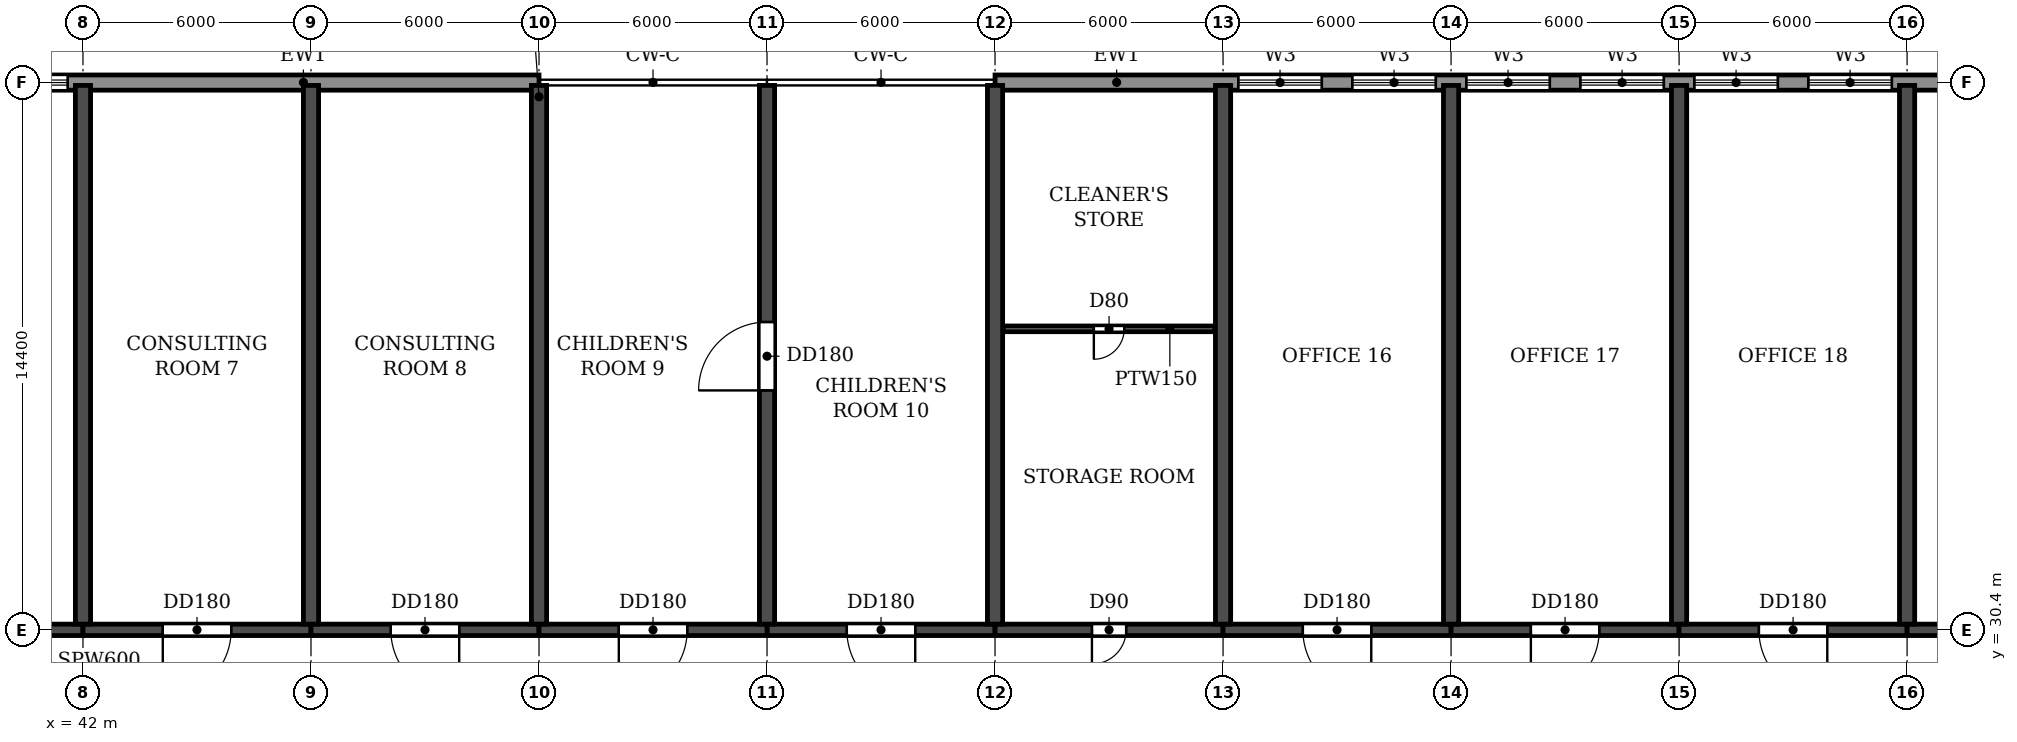
"""IFC4 building model, lengths in metres.
Left out: names, types, materials, properties, quantities, classifications, styles, units other than length and angle.
Written with IfcOpenShell. Run it as: python <this file> out.ifc"""

import sys

from ifc_helpers import new_model, si_unit, direction, frame, frame_2d, origin, place, context, subcontext, project, spatial, rectangle, extrude, element, fill, save


model = new_model("IFC4")
c1 = context("Model", 3, precision=1e-05, world=origin(), true_north=direction((0.0, 1.0)))
c2 = subcontext(c1, "Body", "Model", "MODEL_VIEW")
j1 = project(units=[si_unit("LENGTHUNIT", "METRE"), si_unit("PLANEANGLEUNIT", "RADIAN")], contexts=[c1])
p1 = place(None, origin())
s1 = spatial("IfcSite", under=j1, at=p1, CompositionType="ELEMENT")
p2 = place(p1, origin())
s2 = spatial("IfcBuilding", under=s1, at=p2, CompositionType="ELEMENT")
p3 = place(p2, frame((0.0, 0.0, 53.1)))
s3 = spatial("IfcBuildingStorey", under=s2, at=p3, CompositionType="ELEMENT", Elevation=53.1)
for number, where, z_axis, x_axis in (
    (1, (42.0, 30.55, 0.0), (0.0, 0.0, 1.0), (0.0, 1.0, 0.0)),
    (2, (48.0, 30.55, 0.0), (0.0, 0.0, 1.0), (0.0, 1.0, 0.0)),
    (3, (54.0, 30.55, 0.0), (0.0, 0.0, 1.0), (0.0, 1.0, 0.0)),
):
    element("IfcWall", number, at=place(p3, frame(where, z_axis=z_axis, x_axis=x_axis)), inside=s3, PredefinedType="SHEAR", context=c2, shape_type="SweptSolid", body=[
        extrude(rectangle(XDim=14.175, YDim=0.4, at=frame_2d((7.087, 0.0))), origin(), (0.0, 0.0, 1.0), 3.05),
    ])
p4 = place(p3, frame((60.0, 30.55, 0.0), z_axis=(0.0, 0.0, 1.0), x_axis=(0.0, 1.0, 0.0)))
e4 = element("IfcWall", 4, at=p4, inside=s3, PredefinedType="SHEAR", context=c2, shape_type="SweptSolid", body=[
    extrude(rectangle(XDim=14.175, YDim=0.4, at=frame_2d((7.087, 0.0))), origin(), (0.0, 0.0, 1.0), 3.05),
])
p5 = place(p4, frame((6.15, 0.0, 0.0)))
e5 = element("IfcOpeningElement", 5, at=p5, cuts=e4, PredefinedType="OPENING", context=c2, shape_type="SweptSolid", body=[
    extrude(rectangle(XDim=1.8, YDim=2.1, at=frame_2d((0.9, 1.05))), frame((0.0, 0.21, 0.0), z_axis=(0.0, -1.0, 0.0), x_axis=(1.0, 0.0, 0.0)), (0.0, 0.0, 1.0), 0.42),
])
for number, where, z_axis, x_axis in (
    (6, (66.0, 30.55, 0.0), (0.0, 0.0, 1.0), (0.0, 1.0, 0.0)),
    (7, (72.0, 30.55, 0.0), (0.0, 0.0, 1.0), (0.0, 1.0, 0.0)),
    (8, (78.0, 30.55, 0.0), (0.0, 0.0, 1.0), (0.0, 1.0, 0.0)),
    (9, (84.0, 30.55, 0.0), (0.0, 0.0, 1.0), (0.0, 1.0, 0.0)),
    (10, (90.0, 30.55, 0.0), (0.0, 0.0, 1.0), (0.0, 1.0, 0.0)),
):
    element("IfcWall", number, at=place(p3, frame(where, z_axis=z_axis, x_axis=x_axis)), inside=s3, PredefinedType="SHEAR", context=c2, shape_type="SweptSolid", body=[
        extrude(rectangle(XDim=14.175, YDim=0.4, at=frame_2d((7.087, 0.0))), origin(), (0.0, 0.0, 1.0), 3.05),
    ])
p6 = place(p3, frame((36.0, 30.4, 0.0), z_axis=(0.0, 0.0, 1.0), x_axis=(1.0, 0.0, 0.0)))
e11 = element("IfcWall", 11, at=p6, inside=s3, PredefinedType="SHEAR", context=c2, shape_type="SweptSolid", body=[
    extrude(rectangle(XDim=6.0, YDim=0.3, at=frame_2d((3.0, 0.0))), origin(), (0.0, 0.0, 1.0), 2.45),
])
p7 = place(p6, frame((2.1, 0.0, 0.0)))
e12 = element("IfcOpeningElement", 12, at=p7, cuts=e11, PredefinedType="OPENING", context=c2, shape_type="SweptSolid", body=[
    extrude(rectangle(XDim=1.8, YDim=2.1, at=frame_2d((0.9, 1.05))), frame((0.0, 0.16, 0.0), z_axis=(0.0, -1.0, 0.0), x_axis=(1.0, 0.0, 0.0)), (0.0, 0.0, 1.0), 0.32),
])
p8 = place(p3, frame((42.0, 30.4, 0.0), z_axis=(0.0, 0.0, 1.0), x_axis=(1.0, 0.0, 0.0)))
e13 = element("IfcWall", 13, at=p8, inside=s3, PredefinedType="SHEAR", context=c2, shape_type="SweptSolid", body=[
    extrude(rectangle(XDim=6.0, YDim=0.3, at=frame_2d((3.0, 0.0))), origin(), (0.0, 0.0, 1.0), 2.45),
])
p9 = place(p8, frame((2.1, 0.0, 0.0)))
e14 = element("IfcOpeningElement", 14, at=p9, cuts=e13, PredefinedType="OPENING", context=c2, shape_type="SweptSolid", body=[
    extrude(rectangle(XDim=1.8, YDim=2.1, at=frame_2d((0.9, 1.05))), frame((0.0, 0.16, 0.0), z_axis=(0.0, -1.0, 0.0), x_axis=(1.0, 0.0, 0.0)), (0.0, 0.0, 1.0), 0.32),
])
p10 = place(p3, frame((48.0, 30.4, 0.0), z_axis=(0.0, 0.0, 1.0), x_axis=(1.0, 0.0, 0.0)))
e15 = element("IfcWall", 15, at=p10, inside=s3, PredefinedType="SHEAR", context=c2, shape_type="SweptSolid", body=[
    extrude(rectangle(XDim=6.0, YDim=0.3, at=frame_2d((3.0, 0.0))), origin(), (0.0, 0.0, 1.0), 2.45),
])
p11 = place(p10, frame((2.1, 0.0, 0.0)))
e16 = element("IfcOpeningElement", 16, at=p11, cuts=e15, PredefinedType="OPENING", context=c2, shape_type="SweptSolid", body=[
    extrude(rectangle(XDim=1.8, YDim=2.1, at=frame_2d((0.9, 1.05))), frame((0.0, 0.16, 0.0), z_axis=(0.0, -1.0, 0.0), x_axis=(1.0, 0.0, 0.0)), (0.0, 0.0, 1.0), 0.32),
])
p12 = place(p3, frame((54.0, 30.4, 0.0), z_axis=(0.0, 0.0, 1.0), x_axis=(1.0, 0.0, 0.0)))
e17 = element("IfcWall", 17, at=p12, inside=s3, PredefinedType="SHEAR", context=c2, shape_type="SweptSolid", body=[
    extrude(rectangle(XDim=6.0, YDim=0.3, at=frame_2d((3.0, 0.0))), origin(), (0.0, 0.0, 1.0), 2.45),
])
p13 = place(p12, frame((2.1, 0.0, 0.0)))
e18 = element("IfcOpeningElement", 18, at=p13, cuts=e17, PredefinedType="OPENING", context=c2, shape_type="SweptSolid", body=[
    extrude(rectangle(XDim=1.8, YDim=2.1, at=frame_2d((0.9, 1.05))), frame((0.0, 0.16, 0.0), z_axis=(0.0, -1.0, 0.0), x_axis=(1.0, 0.0, 0.0)), (0.0, 0.0, 1.0), 0.32),
])
p14 = place(p3, frame((60.0, 30.4, 0.0), z_axis=(0.0, 0.0, 1.0), x_axis=(1.0, 0.0, 0.0)))
e19 = element("IfcWall", 19, at=p14, inside=s3, PredefinedType="SHEAR", context=c2, shape_type="SweptSolid", body=[
    extrude(rectangle(XDim=6.0, YDim=0.3, at=frame_2d((3.0, 0.0))), origin(), (0.0, 0.0, 1.0), 2.45),
])
p15 = place(p14, frame((2.1, 0.0, 0.0)))
e20 = element("IfcOpeningElement", 20, at=p15, cuts=e19, PredefinedType="OPENING", context=c2, shape_type="SweptSolid", body=[
    extrude(rectangle(XDim=1.8, YDim=2.1, at=frame_2d((0.9, 1.05))), frame((0.0, 0.16, 0.0), z_axis=(0.0, -1.0, 0.0), x_axis=(1.0, 0.0, 0.0)), (0.0, 0.0, 1.0), 0.32),
])
p16 = place(p3, frame((66.0, 30.4, 0.0), z_axis=(0.0, 0.0, 1.0), x_axis=(1.0, 0.0, 0.0)))
e21 = element("IfcWall", 21, at=p16, inside=s3, PredefinedType="SHEAR", context=c2, shape_type="SweptSolid", body=[
    extrude(rectangle(XDim=6.0, YDim=0.3, at=frame_2d((3.0, 0.0))), origin(), (0.0, 0.0, 1.0), 2.45),
])
p17 = place(p16, frame((2.55, 0.0, 0.0)))
e22 = element("IfcOpeningElement", 22, at=p17, cuts=e21, PredefinedType="OPENING", context=c2, shape_type="SweptSolid", body=[
    extrude(rectangle(XDim=0.9, YDim=2.1, at=frame_2d((0.45, 1.05))), frame((0.0, 0.16, 0.0), z_axis=(0.0, -1.0, 0.0), x_axis=(1.0, 0.0, 0.0)), (0.0, 0.0, 1.0), 0.32),
])
p18 = place(p3, frame((72.0, 30.4, 0.0), z_axis=(0.0, 0.0, 1.0), x_axis=(1.0, 0.0, 0.0)))
e23 = element("IfcWall", 23, at=p18, inside=s3, PredefinedType="SHEAR", context=c2, shape_type="SweptSolid", body=[
    extrude(rectangle(XDim=6.0, YDim=0.3, at=frame_2d((3.0, 0.0))), origin(), (0.0, 0.0, 1.0), 2.45),
])
p19 = place(p18, frame((2.1, 0.0, 0.0)))
e24 = element("IfcOpeningElement", 24, at=p19, cuts=e23, PredefinedType="OPENING", context=c2, shape_type="SweptSolid", body=[
    extrude(rectangle(XDim=1.8, YDim=2.1, at=frame_2d((0.9, 1.05))), frame((0.0, 0.16, 0.0), z_axis=(0.0, -1.0, 0.0), x_axis=(1.0, 0.0, 0.0)), (0.0, 0.0, 1.0), 0.32),
])
p20 = place(p3, frame((78.0, 30.4, 0.0), z_axis=(0.0, 0.0, 1.0), x_axis=(1.0, 0.0, 0.0)))
e25 = element("IfcWall", 25, at=p20, inside=s3, PredefinedType="SHEAR", context=c2, shape_type="SweptSolid", body=[
    extrude(rectangle(XDim=6.0, YDim=0.3, at=frame_2d((3.0, 0.0))), origin(), (0.0, 0.0, 1.0), 2.45),
])
p21 = place(p20, frame((2.1, 0.0, 0.0)))
e26 = element("IfcOpeningElement", 26, at=p21, cuts=e25, PredefinedType="OPENING", context=c2, shape_type="SweptSolid", body=[
    extrude(rectangle(XDim=1.8, YDim=2.1, at=frame_2d((0.9, 1.05))), frame((0.0, 0.16, 0.0), z_axis=(0.0, -1.0, 0.0), x_axis=(1.0, 0.0, 0.0)), (0.0, 0.0, 1.0), 0.32),
])
p22 = place(p3, frame((84.0, 30.4, 0.0), z_axis=(0.0, 0.0, 1.0), x_axis=(1.0, 0.0, 0.0)))
e27 = element("IfcWall", 27, at=p22, inside=s3, PredefinedType="SHEAR", context=c2, shape_type="SweptSolid", body=[
    extrude(rectangle(XDim=6.0, YDim=0.3, at=frame_2d((3.0, 0.0))), origin(), (0.0, 0.0, 1.0), 2.45),
])
p23 = place(p22, frame((2.1, 0.0, 0.0)))
e28 = element("IfcOpeningElement", 28, at=p23, cuts=e27, PredefinedType="OPENING", context=c2, shape_type="SweptSolid", body=[
    extrude(rectangle(XDim=1.8, YDim=2.1, at=frame_2d((0.9, 1.05))), frame((0.0, 0.16, 0.0), z_axis=(0.0, -1.0, 0.0), x_axis=(1.0, 0.0, 0.0)), (0.0, 0.0, 1.0), 0.32),
])
p24 = place(p3, frame((90.0, 30.4, 0.0), z_axis=(0.0, 0.0, 1.0), x_axis=(1.0, 0.0, 0.0)))
e29 = element("IfcWall", 29, at=p24, inside=s3, PredefinedType="SHEAR", context=c2, shape_type="SweptSolid", body=[
    extrude(rectangle(XDim=5.8, YDim=0.3, at=frame_2d((2.9, 0.0))), origin(), (0.0, 0.0, 1.0), 2.45),
])
p25 = place(p24, frame((2.1, 0.0, 0.0)))
e30 = element("IfcOpeningElement", 30, at=p25, cuts=e29, PredefinedType="OPENING", context=c2, shape_type="SweptSolid", body=[
    extrude(rectangle(XDim=1.8, YDim=2.1, at=frame_2d((0.9, 1.05))), frame((0.0, 0.16, 0.0), z_axis=(0.0, -1.0, 0.0), x_axis=(1.0, 0.0, 0.0)), (0.0, 0.0, 1.0), 0.32),
])
p26 = place(p3, frame((91.317, 44.8, 0.0), z_axis=(0.0, 0.0, 1.0), x_axis=(-1.0, 0.0, 0.0)))
e31 = element("IfcWall", 31, at=p26, inside=s3, PredefinedType="STANDARD", context=c2, shape_type="SweptSolid", body=[
    extrude(rectangle(XDim=25.317, YDim=0.4, at=frame_2d((12.659, 0.0))), origin(), (0.0, 0.0, 1.0), 3.05),
])
p27 = place(p26, frame((16.717, 0.0, 0.6)))
e32 = element("IfcOpeningElement", 32, at=p27, cuts=e31, PredefinedType="OPENING", context=c2, shape_type="SweptSolid", body=[
    extrude(rectangle(XDim=2.2, YDim=1.8, at=frame_2d((1.1, 0.9))), frame((0.0, 0.21, 0.0), z_axis=(0.0, -1.0, 0.0), x_axis=(1.0, 0.0, 0.0)), (0.0, 0.0, 1.0), 0.42),
])
p28 = place(p26, frame((13.717, 0.0, 0.6)))
e33 = element("IfcOpeningElement", 33, at=p28, cuts=e31, PredefinedType="OPENING", context=c2, shape_type="SweptSolid", body=[
    extrude(rectangle(XDim=2.2, YDim=1.8, at=frame_2d((1.1, 0.9))), frame((0.0, 0.21, 0.0), z_axis=(0.0, -1.0, 0.0), x_axis=(1.0, 0.0, 0.0)), (0.0, 0.0, 1.0), 0.42),
])
p29 = place(p26, frame((10.717, 0.0, 0.6)))
e34 = element("IfcOpeningElement", 34, at=p29, cuts=e31, PredefinedType="OPENING", context=c2, shape_type="SweptSolid", body=[
    extrude(rectangle(XDim=2.2, YDim=1.8, at=frame_2d((1.1, 0.9))), frame((0.0, 0.21, 0.0), z_axis=(0.0, -1.0, 0.0), x_axis=(1.0, 0.0, 0.0)), (0.0, 0.0, 1.0), 0.42),
])
p30 = place(p26, frame((7.717, 0.0, 0.6)))
e35 = element("IfcOpeningElement", 35, at=p30, cuts=e31, PredefinedType="OPENING", context=c2, shape_type="SweptSolid", body=[
    extrude(rectangle(XDim=2.2, YDim=1.8, at=frame_2d((1.1, 0.9))), frame((0.0, 0.21, 0.0), z_axis=(0.0, -1.0, 0.0), x_axis=(1.0, 0.0, 0.0)), (0.0, 0.0, 1.0), 0.42),
])
p31 = place(p26, frame((4.717, 0.0, 0.6)))
e36 = element("IfcOpeningElement", 36, at=p31, cuts=e31, PredefinedType="OPENING", context=c2, shape_type="SweptSolid", body=[
    extrude(rectangle(XDim=2.2, YDim=1.8, at=frame_2d((1.1, 0.9))), frame((0.0, 0.21, 0.0), z_axis=(0.0, -1.0, 0.0), x_axis=(1.0, 0.0, 0.0)), (0.0, 0.0, 1.0), 0.42),
])
p32 = place(p26, frame((1.717, 0.0, 0.6)))
e37 = element("IfcOpeningElement", 37, at=p32, cuts=e31, PredefinedType="OPENING", context=c2, shape_type="SweptSolid", body=[
    extrude(rectangle(XDim=2.2, YDim=1.8, at=frame_2d((1.1, 0.9))), frame((0.0, 0.21, 0.0), z_axis=(0.0, -1.0, 0.0), x_axis=(1.0, 0.0, 0.0)), (0.0, 0.0, 1.0), 0.42),
])
p33 = place(p3, frame((54.0, 44.8, 0.0), z_axis=(0.0, 0.0, 1.0), x_axis=(-1.0, 0.0, 0.0)))
e38 = element("IfcWall", 38, at=p33, inside=s3, PredefinedType="STANDARD", context=c2, shape_type="SweptSolid", body=[
    extrude(rectangle(XDim=30.0, YDim=0.4, at=frame_2d((15.0, 0.0))), origin(), (0.0, 0.0, 1.0), 3.05),
])
p34 = place(p33, frame((15.4, 0.0, 0.6)))
e39 = element("IfcOpeningElement", 39, at=p34, cuts=e38, PredefinedType="OPENING", context=c2, shape_type="SweptSolid", body=[
    extrude(rectangle(XDim=2.2, YDim=1.8, at=frame_2d((1.1, 0.9))), frame((0.0, 0.21, 0.0), z_axis=(0.0, -1.0, 0.0), x_axis=(1.0, 0.0, 0.0)), (0.0, 0.0, 1.0), 0.42),
])
p35 = place(p33, frame((12.4, 0.0, 0.6)))
e40 = element("IfcOpeningElement", 40, at=p35, cuts=e38, PredefinedType="OPENING", context=c2, shape_type="SweptSolid", body=[
    extrude(rectangle(XDim=2.2, YDim=1.8, at=frame_2d((1.1, 0.9))), frame((0.0, 0.21, 0.0), z_axis=(0.0, -1.0, 0.0), x_axis=(1.0, 0.0, 0.0)), (0.0, 0.0, 1.0), 0.42),
])
p36 = place(p3, frame((66.21, 38.32, 0.0), z_axis=(0.0, 0.0, 1.0), x_axis=(1.0, 0.0, 0.0)))
e41 = element("IfcWall", 41, at=p36, inside=s3, PredefinedType="PARTITIONING", context=c2, shape_type="SweptSolid", body=[
    extrude(rectangle(XDim=5.58, YDim=0.15, at=frame_2d((2.79, 0.0))), origin(), (0.0, 0.0, 1.0), 3.05),
])
p37 = place(p36, frame((2.39, 0.0, 0.0)))
e42 = element("IfcOpeningElement", 42, at=p37, cuts=e41, PredefinedType="OPENING", context=c2, shape_type="SweptSolid", body=[
    extrude(rectangle(XDim=0.8, YDim=2.1, at=frame_2d((0.4, 1.05))), frame((0.0, 0.085, 0.0), z_axis=(0.0, -1.0, 0.0), x_axis=(1.0, 0.0, 0.0)), (0.0, 0.0, 1.0), 0.17),
])
p38 = place(p27, origin())
e43 = element("IfcWindow", 43, at=p38, inside=s3, PartitioningType="DOUBLE_PANEL_HORIZONTAL", PredefinedType="WINDOW", context=c2, shape_type="SweptSolid", body=[
    extrude(rectangle(XDim=2.2, YDim=1.8, at=frame_2d((1.1, 0.9))), frame((0.0, 0.03, 0.0), z_axis=(0.0, -1.0, 0.0), x_axis=(1.0, 0.0, 0.0)), (0.0, 0.0, 1.0), 0.06),
])
fill(e32, e43)
p39 = place(p28, origin())
e44 = element("IfcWindow", 44, at=p39, inside=s3, PartitioningType="DOUBLE_PANEL_HORIZONTAL", PredefinedType="WINDOW", context=c2, shape_type="SweptSolid", body=[
    extrude(rectangle(XDim=2.2, YDim=1.8, at=frame_2d((1.1, 0.9))), frame((0.0, 0.03, 0.0), z_axis=(0.0, -1.0, 0.0), x_axis=(1.0, 0.0, 0.0)), (0.0, 0.0, 1.0), 0.06),
])
fill(e33, e44)
p40 = place(p29, origin())
e45 = element("IfcWindow", 45, at=p40, inside=s3, PartitioningType="DOUBLE_PANEL_HORIZONTAL", PredefinedType="WINDOW", context=c2, shape_type="SweptSolid", body=[
    extrude(rectangle(XDim=2.2, YDim=1.8, at=frame_2d((1.1, 0.9))), frame((0.0, 0.03, 0.0), z_axis=(0.0, -1.0, 0.0), x_axis=(1.0, 0.0, 0.0)), (0.0, 0.0, 1.0), 0.06),
])
fill(e34, e45)
p41 = place(p30, origin())
e46 = element("IfcWindow", 46, at=p41, inside=s3, PartitioningType="DOUBLE_PANEL_HORIZONTAL", PredefinedType="WINDOW", context=c2, shape_type="SweptSolid", body=[
    extrude(rectangle(XDim=2.2, YDim=1.8, at=frame_2d((1.1, 0.9))), frame((0.0, 0.03, 0.0), z_axis=(0.0, -1.0, 0.0), x_axis=(1.0, 0.0, 0.0)), (0.0, 0.0, 1.0), 0.06),
])
fill(e35, e46)
p42 = place(p31, origin())
e47 = element("IfcWindow", 47, at=p42, inside=s3, PartitioningType="DOUBLE_PANEL_HORIZONTAL", PredefinedType="WINDOW", context=c2, shape_type="SweptSolid", body=[
    extrude(rectangle(XDim=2.2, YDim=1.8, at=frame_2d((1.1, 0.9))), frame((0.0, 0.03, 0.0), z_axis=(0.0, -1.0, 0.0), x_axis=(1.0, 0.0, 0.0)), (0.0, 0.0, 1.0), 0.06),
])
fill(e36, e47)
p43 = place(p32, origin())
e48 = element("IfcWindow", 48, at=p43, inside=s3, PartitioningType="DOUBLE_PANEL_HORIZONTAL", PredefinedType="WINDOW", context=c2, shape_type="SweptSolid", body=[
    extrude(rectangle(XDim=2.2, YDim=1.8, at=frame_2d((1.1, 0.9))), frame((0.0, 0.03, 0.0), z_axis=(0.0, -1.0, 0.0), x_axis=(1.0, 0.0, 0.0)), (0.0, 0.0, 1.0), 0.06),
])
fill(e37, e48)
p44 = place(p35, origin())
e49 = element("IfcWindow", 49, at=p44, inside=s3, PartitioningType="DOUBLE_PANEL_HORIZONTAL", PredefinedType="WINDOW", context=c2, shape_type="SweptSolid", body=[
    extrude(rectangle(XDim=2.2, YDim=1.8, at=frame_2d((1.1, 0.9))), frame((0.0, 0.03, 0.0), z_axis=(0.0, -1.0, 0.0), x_axis=(1.0, 0.0, 0.0)), (0.0, 0.0, 1.0), 0.06),
])
fill(e40, e49)
p45 = place(p9, frame((1.8, 0.0, 0.0), z_axis=(0.0, 0.0, 1.0), x_axis=(-1.0, 0.0, 0.0)))
e50 = element("IfcDoor", 50, at=p45, inside=s3, OperationType="DOUBLE_DOOR_SINGLE_SWING", PredefinedType="DOOR", context=c2, shape_type="SweptSolid", body=[
    extrude(rectangle(XDim=1.8, YDim=2.1, at=frame_2d((0.9, 1.05))), frame((0.0, 0.025, 0.0), z_axis=(0.0, -1.0, 0.0), x_axis=(1.0, 0.0, 0.0)), (0.0, 0.0, 1.0), 0.05),
])
fill(e14, e50)
p46 = place(p11, frame((1.8, 0.0, 0.0), z_axis=(0.0, 0.0, 1.0), x_axis=(-1.0, 0.0, 0.0)))
e51 = element("IfcDoor", 51, at=p46, inside=s3, OperationType="DOUBLE_DOOR_SINGLE_SWING", PredefinedType="DOOR", context=c2, shape_type="SweptSolid", body=[
    extrude(rectangle(XDim=1.8, YDim=2.1, at=frame_2d((0.9, 1.05))), frame((0.0, 0.025, 0.0), z_axis=(0.0, -1.0, 0.0), x_axis=(1.0, 0.0, 0.0)), (0.0, 0.0, 1.0), 0.05),
])
fill(e16, e51)
p47 = place(p13, frame((1.8, 0.0, 0.0), z_axis=(0.0, 0.0, 1.0), x_axis=(-1.0, 0.0, 0.0)))
e52 = element("IfcDoor", 52, at=p47, inside=s3, OperationType="DOUBLE_DOOR_SINGLE_SWING", PredefinedType="DOOR", context=c2, shape_type="SweptSolid", body=[
    extrude(rectangle(XDim=1.8, YDim=2.1, at=frame_2d((0.9, 1.05))), frame((0.0, 0.025, 0.0), z_axis=(0.0, -1.0, 0.0), x_axis=(1.0, 0.0, 0.0)), (0.0, 0.0, 1.0), 0.05),
])
fill(e18, e52)
p48 = place(p15, frame((1.8, 0.0, 0.0), z_axis=(0.0, 0.0, 1.0), x_axis=(-1.0, 0.0, 0.0)))
e53 = element("IfcDoor", 53, at=p48, inside=s3, OperationType="DOUBLE_DOOR_SINGLE_SWING", PredefinedType="DOOR", context=c2, shape_type="SweptSolid", body=[
    extrude(rectangle(XDim=1.8, YDim=2.1, at=frame_2d((0.9, 1.05))), frame((0.0, 0.025, 0.0), z_axis=(0.0, -1.0, 0.0), x_axis=(1.0, 0.0, 0.0)), (0.0, 0.0, 1.0), 0.05),
])
fill(e20, e53)
p49 = place(p17, frame((0.9, 0.0, 0.0), z_axis=(0.0, 0.0, 1.0), x_axis=(-1.0, 0.0, 0.0)))
e54 = element("IfcDoor", 54, at=p49, inside=s3, OperationType="SINGLE_SWING_RIGHT", PredefinedType="DOOR", context=c2, shape_type="SweptSolid", body=[
    extrude(rectangle(XDim=0.9, YDim=2.1, at=frame_2d((0.45, 1.05))), frame((0.0, 0.025, 0.0), z_axis=(0.0, -1.0, 0.0), x_axis=(1.0, 0.0, 0.0)), (0.0, 0.0, 1.0), 0.05),
])
fill(e22, e54)
p50 = place(p19, frame((1.8, 0.0, 0.0), z_axis=(0.0, 0.0, 1.0), x_axis=(-1.0, 0.0, 0.0)))
e55 = element("IfcDoor", 55, at=p50, inside=s3, OperationType="DOUBLE_DOOR_SINGLE_SWING", PredefinedType="DOOR", context=c2, shape_type="SweptSolid", body=[
    extrude(rectangle(XDim=1.8, YDim=2.1, at=frame_2d((0.9, 1.05))), frame((0.0, 0.025, 0.0), z_axis=(0.0, -1.0, 0.0), x_axis=(1.0, 0.0, 0.0)), (0.0, 0.0, 1.0), 0.05),
])
fill(e24, e55)
p51 = place(p21, frame((1.8, 0.0, 0.0), z_axis=(0.0, 0.0, 1.0), x_axis=(-1.0, 0.0, 0.0)))
e56 = element("IfcDoor", 56, at=p51, inside=s3, OperationType="DOUBLE_DOOR_SINGLE_SWING", PredefinedType="DOOR", context=c2, shape_type="SweptSolid", body=[
    extrude(rectangle(XDim=1.8, YDim=2.1, at=frame_2d((0.9, 1.05))), frame((0.0, 0.025, 0.0), z_axis=(0.0, -1.0, 0.0), x_axis=(1.0, 0.0, 0.0)), (0.0, 0.0, 1.0), 0.05),
])
fill(e26, e56)
p52 = place(p23, frame((1.8, 0.0, 0.0), z_axis=(0.0, 0.0, 1.0), x_axis=(-1.0, 0.0, 0.0)))
e57 = element("IfcDoor", 57, at=p52, inside=s3, OperationType="DOUBLE_DOOR_SINGLE_SWING", PredefinedType="DOOR", context=c2, shape_type="SweptSolid", body=[
    extrude(rectangle(XDim=1.8, YDim=2.1, at=frame_2d((0.9, 1.05))), frame((0.0, 0.025, 0.0), z_axis=(0.0, -1.0, 0.0), x_axis=(1.0, 0.0, 0.0)), (0.0, 0.0, 1.0), 0.05),
])
fill(e28, e57)
p53 = place(p5, origin())
e58 = element("IfcDoor", 58, at=p53, inside=s3, OperationType="DOUBLE_DOOR_SINGLE_SWING", PredefinedType="DOOR", context=c2, shape_type="SweptSolid", body=[
    extrude(rectangle(XDim=1.8, YDim=2.1, at=frame_2d((0.9, 1.05))), frame((0.0, 0.025, 0.0), z_axis=(0.0, -1.0, 0.0), x_axis=(1.0, 0.0, 0.0)), (0.0, 0.0, 1.0), 0.05),
])
fill(e5, e58)
p54 = place(p37, frame((0.8, 0.0, 0.0), z_axis=(0.0, 0.0, 1.0), x_axis=(-1.0, 0.0, 0.0)))
e59 = element("IfcDoor", 59, at=p54, inside=s3, OperationType="SINGLE_SWING_RIGHT", PredefinedType="DOOR", context=c2, shape_type="SweptSolid", body=[
    extrude(rectangle(XDim=0.8, YDim=2.1, at=frame_2d((0.4, 1.05))), frame((0.0, 0.025, 0.0), z_axis=(0.0, -1.0, 0.0), x_axis=(1.0, 0.0, 0.0)), (0.0, 0.0, 1.0), 0.05),
])
fill(e42, e59)
save(model, sys.argv[1])
